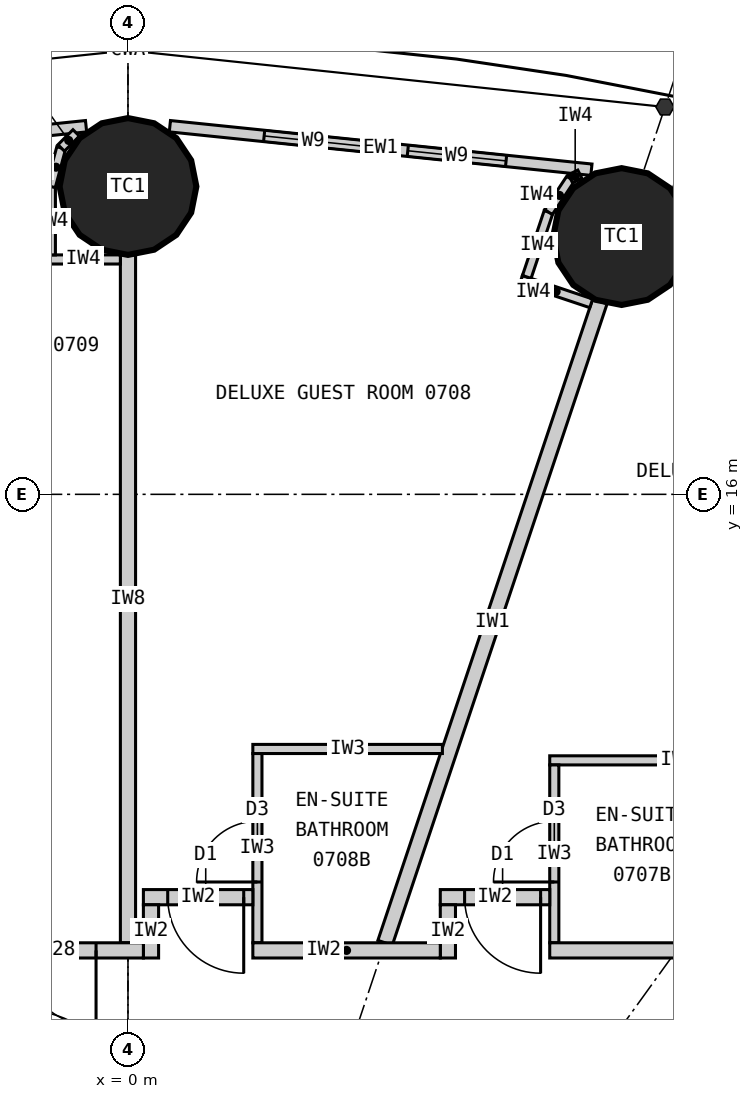
"""IFC4 building model, lengths in metres.
Left out: names, types, materials, properties, quantities, classifications, styles, units other than length and angle.
Written with IfcOpenShell. Run it as: python <this file> out.ifc"""

import sys

from ifc_helpers import new_model, si_unit, direction, frame, frame_2d, origin, origin_2d, place, context, subcontext, project, spatial, rectangle, circle, extrude, element, fill, save


model = new_model("IFC4")
c1 = context("Model", 3, precision=1e-05, world=origin(), true_north=direction((0.0, 1.0)))
c2 = subcontext(c1, "Body", "Model", "MODEL_VIEW")
j1 = project(units=[si_unit("LENGTHUNIT", "METRE"), si_unit("PLANEANGLEUNIT", "RADIAN")], contexts=[c1])
p1 = place(None, origin())
s1 = spatial("IfcSite", under=j1, at=p1, CompositionType="ELEMENT")
p2 = place(p1, origin())
s2 = spatial("IfcBuilding", under=s1, at=p2, CompositionType="ELEMENT")
p3 = place(p2, frame((0.0, 0.0, 36.0)))
s3 = spatial("IfcBuildingStorey", under=s2, at=p3, CompositionType="ELEMENT", Elevation=36.0)
for number, where, z_axis, x_axis in (
    (1, (6.495, 19.391, 0.0), (0.0, 0.0, 1.0), (1.0, 0.0, 0.0)),
    (2, (0.0, 20.05, 0.0), (0.0, 0.0, 1.0), (1.0, 0.0, 0.0)),
):
    element("IfcColumn", number, at=place(p3, frame(where, z_axis=z_axis, x_axis=x_axis)), inside=s3, PredefinedType="COLUMN", context=c2, shape_type="SweptSolid", body=[
        extrude(circle(Radius=0.9, at=origin_2d()), origin(), (0.0, 0.0, 1.0), 3.3),
    ])
p4 = place(p3, frame((12.366, 18.384, 0.0), z_axis=(0.0, 0.0, 1.0), x_axis=(-0.951138486029, 0.308764603532, 0.0)))
e3 = element("IfcWall", 3, at=p4, inside=s3, PredefinedType="ELEMENTEDWALL", context=c2, shape_type="SweptSolid", body=[
    extrude(rectangle(XDim=5.444, YDim=0.15, at=frame_2d((2.722, 0.0))), origin(), (0.0, 0.0, 1.0), 3.12),
])
p5 = place(p4, frame((0.96, 0.0, 0.9)))
e4 = element("IfcOpeningElement", 4, at=p5, cuts=e3, PredefinedType="OPENING", context=c2, shape_type="SweptSolid", body=[
    extrude(rectangle(XDim=1.3, YDim=1.9, at=frame_2d((0.65, 0.95))), frame((0.0, 0.085, 0.0), z_axis=(0.0, -1.0, 0.0), x_axis=(1.0, 0.0, 0.0)), (0.0, 0.0, 1.0), 0.17),
])
p6 = place(p4, frame((2.86, 0.0, 0.9)))
e5 = element("IfcOpeningElement", 5, at=p6, cuts=e3, PredefinedType="OPENING", context=c2, shape_type="SweptSolid", body=[
    extrude(rectangle(XDim=1.3, YDim=1.9, at=frame_2d((0.65, 0.95))), frame((0.0, 0.085, 0.0), z_axis=(0.0, -1.0, 0.0), x_axis=(1.0, 0.0, 0.0)), (0.0, 0.0, 1.0), 0.17),
])
p7 = place(p3, frame((6.098, 20.271, 0.0), z_axis=(0.0, 0.0, 1.0), x_axis=(-0.994723735084, 0.102589915983, 0.0)))
e6 = element("IfcWall", 6, at=p7, inside=s3, PredefinedType="ELEMENTEDWALL", context=c2, shape_type="SweptSolid", body=[
    extrude(rectangle(XDim=5.576, YDim=0.15, at=frame_2d((2.788, 0.0))), origin(), (0.0, 0.0, 1.0), 3.12),
])
p8 = place(p7, frame((1.129, 0.0, 0.9)))
e7 = element("IfcOpeningElement", 7, at=p8, cuts=e6, PredefinedType="OPENING", context=c2, shape_type="SweptSolid", body=[
    extrude(rectangle(XDim=1.3, YDim=1.9, at=frame_2d((0.65, 0.95))), frame((0.0, 0.085, 0.0), z_axis=(0.0, -1.0, 0.0), x_axis=(1.0, 0.0, 0.0)), (0.0, 0.0, 1.0), 0.17),
])
p9 = place(p7, frame((3.029, 0.0, 0.9)))
e8 = element("IfcOpeningElement", 8, at=p9, cuts=e6, PredefinedType="OPENING", context=c2, shape_type="SweptSolid", body=[
    extrude(rectangle(XDim=1.3, YDim=1.9, at=frame_2d((0.65, 0.95))), frame((0.0, 0.085, 0.0), z_axis=(0.0, -1.0, 0.0), x_axis=(1.0, 0.0, 0.0)), (0.0, 0.0, 1.0), 0.17),
])
p10 = place(p3, frame((-0.551, 20.843, 0.0), z_axis=(0.0, 0.0, 1.0), x_axis=(-0.994723735084, -0.102589915983, 0.0)))
e9 = element("IfcWall", 9, at=p10, inside=s3, PredefinedType="ELEMENTEDWALL", context=c2, shape_type="SweptSolid", body=[
    extrude(rectangle(XDim=5.576, YDim=0.15, at=frame_2d((2.788, 0.0))), origin(), (0.0, 0.0, 1.0), 3.12),
])
p11 = place(p10, frame((1.247, 0.0, 0.9)))
e10 = element("IfcOpeningElement", 10, at=p11, cuts=e9, PredefinedType="OPENING", context=c2, shape_type="SweptSolid", body=[
    extrude(rectangle(XDim=1.3, YDim=1.9, at=frame_2d((0.65, 0.95))), frame((0.0, 0.085, 0.0), z_axis=(0.0, -1.0, 0.0), x_axis=(1.0, 0.0, 0.0)), (0.0, 0.0, 1.0), 0.17),
])
p12 = place(p10, frame((3.147, 0.0, 0.9)))
e11 = element("IfcOpeningElement", 11, at=p12, cuts=e9, PredefinedType="OPENING", context=c2, shape_type="SweptSolid", body=[
    extrude(rectangle(XDim=1.3, YDim=1.9, at=frame_2d((0.65, 0.95))), frame((0.0, 0.085, 0.0), z_axis=(0.0, -1.0, 0.0), x_axis=(1.0, 0.0, 0.0)), (0.0, 0.0, 1.0), 0.17),
])
p13 = place(p3, frame((3.383, 10.1, 0.0), z_axis=(0.0, 0.0, 1.0), x_axis=(0.317593727596, 0.948226884344, 0.0)))
e12 = element("IfcWall", 12, at=p13, inside=s3, PredefinedType="PARTITIONING", context=c2, shape_type="SweptSolid", body=[
    extrude(rectangle(XDim=8.899, YDim=0.2, at=frame_2d((4.449, 0.0))), origin(), (0.0, 0.0, 1.0), 2.32),
])
p14 = place(p3, frame((0.0, 10.1, 0.0), z_axis=(0.0, 0.0, 1.0), x_axis=(0.0, 1.0, 0.0)))
e13 = element("IfcWall", 13, at=p14, inside=s3, PredefinedType="PARTITIONING", context=c2, shape_type="SweptSolid", body=[
    extrude(rectangle(XDim=9.05, YDim=0.2, at=frame_2d((4.525, 0.0))), origin(), (0.0, 0.0, 1.0), 2.32),
])
p15 = place(p3, frame((8.921, 12.5, 0.0), z_axis=(0.0, 0.0, 1.0), x_axis=(-1.0, 0.0, 0.0)))
e14 = element("IfcWall", 14, at=p15, inside=s3, PredefinedType="PARTITIONING", context=c2, shape_type="SweptSolid", body=[
    extrude(rectangle(XDim=3.372, YDim=0.12, at=frame_2d((1.686, 0.0))), origin(), (0.0, 0.0, 1.0), 3.12),
])
p16 = place(p3, frame((5.609, 10.1, 0.0), z_axis=(0.0, 0.0, 1.0), x_axis=(0.0, 1.0, 0.0)))
e15 = element("IfcWall", 15, at=p16, inside=s3, PredefinedType="PARTITIONING", context=c2, shape_type="SweptSolid", body=[
    extrude(rectangle(XDim=2.34, YDim=0.12, at=frame_2d((1.17, 0.0))), origin(), (0.0, 0.0, 1.0), 3.12),
])
p17 = place(p16, frame((0.8, 0.0, 0.0)))
e16 = element("IfcOpeningElement", 16, at=p17, cuts=e15, PredefinedType="OPENING", context=c2, shape_type="SweptSolid", body=[
    extrude(rectangle(XDim=0.8, YDim=2.1, at=frame_2d((0.4, 1.05))), frame((0.0, 0.07, 0.0), z_axis=(0.0, -1.0, 0.0), x_axis=(1.0, 0.0, 0.0)), (0.0, 0.0, 1.0), 0.14),
])
p18 = place(p3, frame((4.137, 12.65, 0.0), z_axis=(0.0, 0.0, 1.0), x_axis=(-1.0, 0.0, 0.0)))
e17 = element("IfcWall", 17, at=p18, inside=s3, PredefinedType="PARTITIONING", context=c2, shape_type="SweptSolid", body=[
    extrude(rectangle(XDim=2.494, YDim=0.12, at=frame_2d((1.247, 0.0))), origin(), (0.0, 0.0, 1.0), 3.12),
])
p19 = place(p3, frame((1.703, 10.1, 0.0), z_axis=(0.0, 0.0, 1.0), x_axis=(0.0, 1.0, 0.0)))
e18 = element("IfcWall", 18, at=p19, inside=s3, PredefinedType="PARTITIONING", context=c2, shape_type="SweptSolid", body=[
    extrude(rectangle(XDim=2.49, YDim=0.12, at=frame_2d((1.245, 0.0))), origin(), (0.0, 0.0, 1.0), 3.12),
])
p20 = place(p19, frame((0.8, 0.0, 0.0)))
e19 = element("IfcOpeningElement", 19, at=p20, cuts=e18, PredefinedType="OPENING", context=c2, shape_type="SweptSolid", body=[
    extrude(rectangle(XDim=0.8, YDim=2.1, at=frame_2d((0.4, 1.05))), frame((0.0, 0.07, 0.0), z_axis=(0.0, -1.0, 0.0), x_axis=(1.0, 0.0, 0.0)), (0.0, 0.0, 1.0), 0.14),
])
p21 = place(p3, frame((4.109, 10.7, 0.0), z_axis=(0.0, 0.0, 1.0), x_axis=(1.0, 0.0, 0.0)))
e20 = element("IfcWall", 20, at=p21, inside=s3, PredefinedType="PARTITIONING", context=c2, shape_type="SweptSolid", body=[
    extrude(rectangle(XDim=1.44, YDim=0.2, at=frame_2d((0.72, 0.0))), origin(), (0.0, 0.0, 1.0), 3.12),
])
p22 = place(p21, frame((0.32, 0.0, 0.0)))
e21 = element("IfcOpeningElement", 21, at=p22, cuts=e20, PredefinedType="OPENING", context=c2, shape_type="SweptSolid", body=[
    extrude(rectangle(XDim=1.0, YDim=2.2, at=frame_2d((0.5, 1.1))), frame((0.0, 0.11, 0.0), z_axis=(0.0, -1.0, 0.0), x_axis=(1.0, 0.0, 0.0)), (0.0, 0.0, 1.0), 0.22),
])
p23 = place(p3, frame((4.209, 9.9, 0.0), z_axis=(0.0, 0.0, 1.0), x_axis=(0.0, 1.0, 0.0)))
e22 = element("IfcWall", 22, at=p23, inside=s3, PredefinedType="PARTITIONING", context=c2, shape_type="SweptSolid", body=[
    extrude(rectangle(XDim=0.7, YDim=0.2, at=frame_2d((0.35, 0.0))), origin(), (0.0, 0.0, 1.0), 3.12),
])
p24 = place(p3, frame((0.203, 10.7, 0.0), z_axis=(0.0, 0.0, 1.0), x_axis=(1.0, 0.0, 0.0)))
e23 = element("IfcWall", 23, at=p24, inside=s3, PredefinedType="PARTITIONING", context=c2, shape_type="SweptSolid", body=[
    extrude(rectangle(XDim=1.44, YDim=0.2, at=frame_2d((0.72, 0.0))), origin(), (0.0, 0.0, 1.0), 3.12),
])
p25 = place(p24, frame((0.32, 0.0, 0.0)))
e24 = element("IfcOpeningElement", 24, at=p25, cuts=e23, PredefinedType="OPENING", context=c2, shape_type="SweptSolid", body=[
    extrude(rectangle(XDim=1.0, YDim=2.2, at=frame_2d((0.5, 1.1))), frame((0.0, 0.11, 0.0), z_axis=(0.0, -1.0, 0.0), x_axis=(1.0, 0.0, 0.0)), (0.0, 0.0, 1.0), 0.22),
])
p26 = place(p3, frame((0.303, 9.9, 0.0), z_axis=(0.0, 0.0, 1.0), x_axis=(0.0, 1.0, 0.0)))
e25 = element("IfcWall", 25, at=p26, inside=s3, PredefinedType="PARTITIONING", context=c2, shape_type="SweptSolid", body=[
    extrude(rectangle(XDim=0.7, YDim=0.2, at=frame_2d((0.35, 0.0))), origin(), (0.0, 0.0, 1.0), 3.12),
])
p27 = place(p3, frame((-4.109, 10.0, 0.0), z_axis=(0.0, 0.0, 1.0), x_axis=(1.0, 0.0, 0.0)))
e26 = element("IfcWall", 26, at=p27, inside=s3, PredefinedType="PARTITIONING", context=c2, shape_type="SweptSolid", body=[
    extrude(rectangle(XDim=4.312, YDim=0.2, at=frame_2d((2.156, 0.0))), origin(), (0.0, 0.0, 1.0), 3.12),
])
p28 = place(p27, frame((2.689, 0.0, 0.0)))
e27 = element("IfcOpeningElement", 27, at=p28, cuts=e26, PredefinedType="OPENING", context=c2, shape_type="SweptSolid", body=[
    extrude(rectangle(XDim=1.0, YDim=2.2, at=frame_2d((0.5, 1.1))), frame((0.0, 0.11, 0.0), z_axis=(0.0, -1.0, 0.0), x_axis=(1.0, 0.0, 0.0)), (0.0, 0.0, 1.0), 0.22),
])
p29 = place(p3, frame((1.643, 10.0, 0.0), z_axis=(0.0, 0.0, 1.0), x_axis=(1.0, 0.0, 0.0)))
e28 = element("IfcWall", 28, at=p29, inside=s3, PredefinedType="PARTITIONING", context=c2, shape_type="SweptSolid", body=[
    extrude(rectangle(XDim=2.466, YDim=0.2, at=frame_2d((1.233, 0.0))), origin(), (0.0, 0.0, 1.0), 3.12),
])
p30 = place(p3, frame((5.549, 10.0, 0.0), z_axis=(0.0, 0.0, 1.0), x_axis=(1.0, 0.0, 0.0)))
e29 = element("IfcWall", 29, at=p30, inside=s3, PredefinedType="PARTITIONING", context=c2, shape_type="SweptSolid", body=[
    extrude(rectangle(XDim=8.551, YDim=0.2, at=frame_2d((4.275, 0.0))), origin(), (0.0, 0.0, 1.0), 3.12),
])
p31 = place(p30, frame((5.656, 0.0, 0.0)))
e30 = element("IfcOpeningElement", 30, at=p31, cuts=e29, PredefinedType="OPENING", context=c2, shape_type="SweptSolid", body=[
    extrude(rectangle(XDim=1.0, YDim=2.2, at=frame_2d((0.5, 1.1))), frame((0.0, 0.11, 0.0), z_axis=(0.0, -1.0, 0.0), x_axis=(1.0, 0.0, 0.0)), (0.0, 0.0, 1.0), 0.22),
])
p32 = place(p3, frame((6.095, 18.513, 0.0), z_axis=(0.0, 0.0, 1.0), x_axis=(-0.948281677008, 0.317430088446, 0.0)))
e31 = element("IfcWall", 31, at=p32, inside=s3, PredefinedType="PARTITIONING", context=c2, shape_type="SweptSolid", body=[
    extrude(rectangle(XDim=0.974, YDim=0.12, at=frame_2d((0.487, 0.0))), origin(), (0.0, 0.0, 1.0), 3.12),
])
p33 = place(p3, frame((5.247, 18.86, 0.0), z_axis=(0.0, 0.0, 1.0), x_axis=(0.317610704489, 0.94822119803, 0.0)))
e32 = element("IfcWall", 32, at=p33, inside=s3, PredefinedType="PARTITIONING", context=c2, shape_type="SweptSolid", body=[
    extrude(rectangle(XDim=0.9, YDim=0.12, at=frame_2d((0.45, 0.0))), origin(), (0.0, 0.0, 1.0), 3.12),
])
p34 = place(p3, frame((5.533, 19.714, 0.0), z_axis=(0.0, 0.0, 1.0), x_axis=(0.552014331743, 0.833834622422, 0.0)))
e33 = element("IfcWall", 33, at=p34, inside=s3, PredefinedType="PARTITIONING", context=c2, shape_type="SweptSolid", body=[
    extrude(rectangle(XDim=0.525, YDim=0.12, at=frame_2d((0.262, 0.0))), origin(), (0.0, 0.0, 1.0), 3.12),
])
p35 = place(p3, frame((5.823, 20.151, 0.0), z_axis=(0.0, 0.0, 1.0), x_axis=(0.894784104941, 0.446499054362, 0.0)))
e34 = element("IfcWall", 34, at=p35, inside=s3, PredefinedType="PARTITIONING", context=c2, shape_type="SweptSolid", body=[
    extrude(rectangle(XDim=0.137, YDim=0.12, at=frame_2d((0.068, 0.0))), origin(), (0.0, 0.0, 1.0), 3.12),
])
p36 = place(p3, frame((-0.1, 19.09, 0.0), z_axis=(0.0, 0.0, 1.0), x_axis=(-1.0, 0.0, 0.0)))
e35 = element("IfcWall", 35, at=p36, inside=s3, PredefinedType="PARTITIONING", context=c2, shape_type="SweptSolid", body=[
    extrude(rectangle(XDim=0.974, YDim=0.12, at=frame_2d((0.487, 0.0))), origin(), (0.0, 0.0, 1.0), 3.12),
])
p37 = place(p3, frame((-1.015, 19.15, 0.0), z_axis=(0.0, 0.0, 1.0), x_axis=(0.0, 1.0, 0.0)))
e36 = element("IfcWall", 36, at=p37, inside=s3, PredefinedType="PARTITIONING", context=c2, shape_type="SweptSolid", body=[
    extrude(rectangle(XDim=0.9, YDim=0.12, at=frame_2d((0.45, 0.0))), origin(), (0.0, 0.0, 1.0), 3.12),
])
p38 = place(p3, frame((-1.015, 20.05, 0.0), z_axis=(0.0, 0.0, 1.0), x_axis=(0.258906465625, 0.96590239779, 0.0)))
e37 = element("IfcWall", 37, at=p38, inside=s3, PredefinedType="PARTITIONING", context=c2, shape_type="SweptSolid", body=[
    extrude(rectangle(XDim=0.525, YDim=0.12, at=frame_2d((0.263, 0.0))), origin(), (0.0, 0.0, 1.0), 3.12),
])
p39 = place(p3, frame((-0.879, 20.557, 0.0), z_axis=(0.0, 0.0, 1.0), x_axis=(0.707106781187, 0.707106781187, 0.0)))
e38 = element("IfcWall", 38, at=p39, inside=s3, PredefinedType="PARTITIONING", context=c2, shape_type="SweptSolid", body=[
    extrude(rectangle(XDim=0.279, YDim=0.12, at=frame_2d((0.14, 0.0))), origin(), (0.0, 0.0, 1.0), 3.12),
])
p40 = place(p8, origin())
e39 = element("IfcWindow", 39, at=p40, inside=s3, PartitioningType="SINGLE_PANEL", PredefinedType="WINDOW", context=c2, shape_type="SweptSolid", body=[
    extrude(rectangle(XDim=1.3, YDim=1.9, at=frame_2d((0.65, 0.95))), frame((0.0, 0.03, 0.0), z_axis=(0.0, -1.0, 0.0), x_axis=(1.0, 0.0, 0.0)), (0.0, 0.0, 1.0), 0.06),
])
fill(e7, e39)
p41 = place(p9, origin())
e40 = element("IfcWindow", 40, at=p41, inside=s3, PartitioningType="SINGLE_PANEL", PredefinedType="WINDOW", context=c2, shape_type="SweptSolid", body=[
    extrude(rectangle(XDim=1.3, YDim=1.9, at=frame_2d((0.65, 0.95))), frame((0.0, 0.03, 0.0), z_axis=(0.0, -1.0, 0.0), x_axis=(1.0, 0.0, 0.0)), (0.0, 0.0, 1.0), 0.06),
])
fill(e8, e40)
p42 = place(p17, origin())
e41 = element("IfcDoor", 41, at=p42, inside=s3, OperationType="SINGLE_SWING_LEFT", PredefinedType="DOOR", context=c2, shape_type="SweptSolid", body=[
    extrude(rectangle(XDim=0.8, YDim=2.1, at=frame_2d((0.4, 1.05))), frame((0.0, 0.025, 0.0), z_axis=(0.0, -1.0, 0.0), x_axis=(1.0, 0.0, 0.0)), (0.0, 0.0, 1.0), 0.05),
])
fill(e16, e41)
p43 = place(p22, origin())
e42 = element("IfcDoor", 42, at=p43, inside=s3, OperationType="SINGLE_SWING_RIGHT", PredefinedType="DOOR", context=c2, shape_type="SweptSolid", body=[
    extrude(rectangle(XDim=1.0, YDim=2.2, at=frame_2d((0.5, 1.1))), frame((0.0, 0.025, 0.0), z_axis=(0.0, -1.0, 0.0), x_axis=(1.0, 0.0, 0.0)), (0.0, 0.0, 1.0), 0.05),
])
fill(e21, e42)
p44 = place(p20, origin())
e43 = element("IfcDoor", 43, at=p44, inside=s3, OperationType="SINGLE_SWING_LEFT", PredefinedType="DOOR", context=c2, shape_type="SweptSolid", body=[
    extrude(rectangle(XDim=0.8, YDim=2.1, at=frame_2d((0.4, 1.05))), frame((0.0, 0.025, 0.0), z_axis=(0.0, -1.0, 0.0), x_axis=(1.0, 0.0, 0.0)), (0.0, 0.0, 1.0), 0.05),
])
fill(e19, e43)
p45 = place(p25, origin())
e44 = element("IfcDoor", 44, at=p45, inside=s3, OperationType="SINGLE_SWING_RIGHT", PredefinedType="DOOR", context=c2, shape_type="SweptSolid", body=[
    extrude(rectangle(XDim=1.0, YDim=2.2, at=frame_2d((0.5, 1.1))), frame((0.0, 0.025, 0.0), z_axis=(0.0, -1.0, 0.0), x_axis=(1.0, 0.0, 0.0)), (0.0, 0.0, 1.0), 0.05),
])
fill(e24, e44)
p46 = place(p28, origin())
e45 = element("IfcDoor", 45, at=p46, inside=s3, OperationType="SINGLE_SWING_RIGHT", PredefinedType="DOOR", context=c2, shape_type="SweptSolid", body=[
    extrude(rectangle(XDim=1.0, YDim=2.2, at=frame_2d((0.5, 1.1))), frame((0.0, 0.025, 0.0), z_axis=(0.0, -1.0, 0.0), x_axis=(1.0, 0.0, 0.0)), (0.0, 0.0, 1.0), 0.05),
])
fill(e27, e45)
save(model, sys.argv[1])
